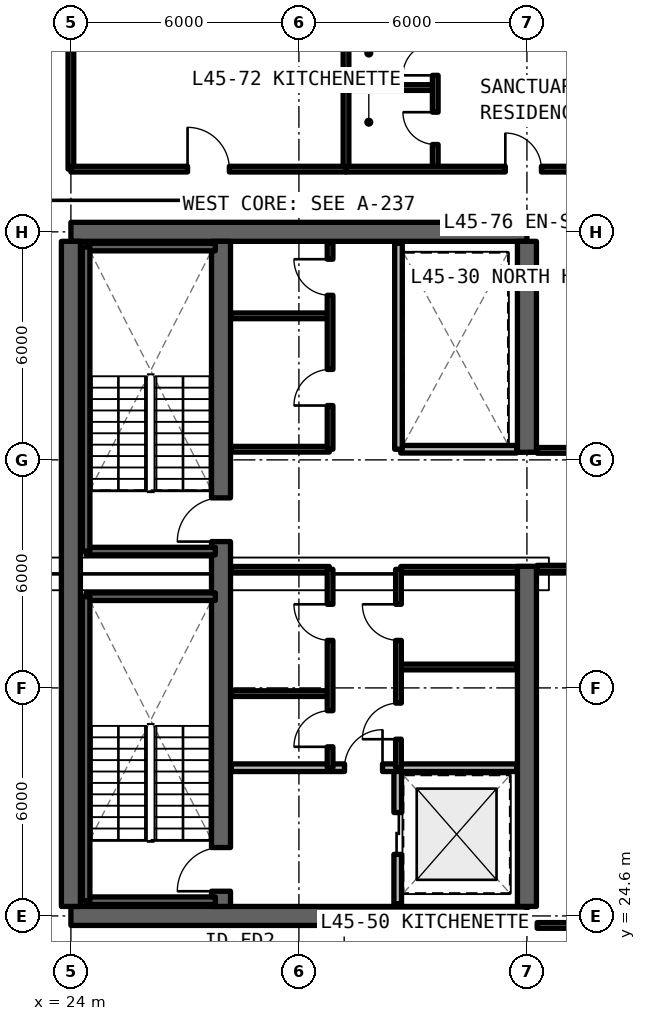
"""IFC4 building model, lengths in metres.
Left out: names, types, materials, properties, quantities, classifications, styles, units other than length and angle.
Written with IfcOpenShell. Run it as: python <this file> out.ifc"""

import sys

from ifc_helpers import new_model, si_unit, direction, frame, frame_2d, origin, place, context, subcontext, project, spatial, rectangle, extrude, element, fill, save


model = new_model("IFC4")
c1 = context("Model", 3, precision=1e-05, world=origin(), true_north=direction((0.0, 1.0)))
c2 = subcontext(c1, "Body", "Model", "MODEL_VIEW")
j1 = project(units=[si_unit("LENGTHUNIT", "METRE"), si_unit("PLANEANGLEUNIT", "RADIAN")], contexts=[c1])
p1 = place(None, origin())
s1 = spatial("IfcSite", under=j1, at=p1, CompositionType="ELEMENT")
p2 = place(p1, origin())
s2 = spatial("IfcBuilding", under=s1, at=p2, CompositionType="ELEMENT")
p3 = place(p2, frame((0.0, 0.0, 162.03)))
s3 = spatial("IfcBuildingStorey", under=s2, at=p3, CompositionType="ELEMENT", Elevation=162.03)
for number, where, z_axis, x_axis in (
    (1, (24.0, 24.6, 0.0), (0.0, 0.0, 1.0), (1.0, 0.0, 0.0)),
    (2, (36.0, 42.6, 0.0), (0.0, 0.0, 1.0), (-1.0, 0.0, 0.0)),
):
    element("IfcWall", number, at=place(p3, frame(where, z_axis=z_axis, x_axis=x_axis)), inside=s3, PredefinedType="SHEAR", context=c2, shape_type="SweptSolid", body=[
        extrude(rectangle(XDim=12.0, YDim=0.5, at=frame_2d((6.0, 0.0))), origin(), (0.0, 0.0, 1.0), 3.63),
    ])
p4 = place(p3, frame((24.0, 24.85, 0.0), z_axis=(0.0, 0.0, 1.0), x_axis=(0.0, 1.0, 0.0)))
e3 = element("IfcWall", 3, at=p4, inside=s3, PredefinedType="SHEAR", context=c2, shape_type="SweptSolid", body=[
    extrude(rectangle(XDim=17.5, YDim=0.5, at=frame_2d((8.75, 0.0))), origin(), (0.0, 0.0, 1.0), 3.63),
])
p5 = place(p3, frame((36.0, 24.85, 0.0), z_axis=(0.0, 0.0, 1.0), x_axis=(0.0, 1.0, 0.0)))
e4 = element("IfcWall", 4, at=p5, inside=s3, PredefinedType="SHEAR", context=c2, shape_type="SweptSolid", body=[
    extrude(rectangle(XDim=8.95, YDim=0.5, at=frame_2d((4.475, 0.0))), origin(), (0.0, 0.0, 1.0), 3.63),
])
p6 = place(p3, frame((36.0, 36.8, 0.0), z_axis=(0.0, 0.0, 1.0), x_axis=(0.0, 1.0, 0.0)))
e5 = element("IfcWall", 5, at=p6, inside=s3, PredefinedType="SHEAR", context=c2, shape_type="SweptSolid", body=[
    extrude(rectangle(XDim=5.55, YDim=0.5, at=frame_2d((2.775, 0.0))), origin(), (0.0, 0.0, 1.0), 3.63),
])
p7 = place(p3, frame((27.95, 24.85, 0.0), z_axis=(0.0, 0.0, 1.0), x_axis=(0.0, 1.0, 0.0)))
e6 = element("IfcWall", 6, at=p7, inside=s3, PredefinedType="SHEAR", context=c2, shape_type="SweptSolid", body=[
    extrude(rectangle(XDim=17.5, YDim=0.5, at=frame_2d((8.75, 0.0))), origin(), (0.0, 0.0, 1.0), 3.63),
])
p8 = place(p7, frame((0.4, 0.0, 0.0)))
e7 = element("IfcOpeningElement", 7, at=p8, cuts=e6, PredefinedType="OPENING", context=c2, shape_type="SweptSolid", body=[
    extrude(rectangle(XDim=1.15, YDim=2.15, at=frame_2d((0.575, 1.075))), frame((0.0, 0.26, 0.0), z_axis=(0.0, -1.0, 0.0), x_axis=(1.0, 0.0, 0.0)), (0.0, 0.0, 1.0), 0.52),
])
p9 = place(p7, frame((9.6, 0.0, 0.0)))
e8 = element("IfcOpeningElement", 8, at=p9, cuts=e6, PredefinedType="OPENING", context=c2, shape_type="SweptSolid", body=[
    extrude(rectangle(XDim=1.15, YDim=2.15, at=frame_2d((0.575, 1.075))), frame((0.0, 0.26, 0.0), z_axis=(0.0, -1.0, 0.0), x_axis=(1.0, 0.0, 0.0)), (0.0, 0.0, 1.0), 0.52),
])
p10 = place(p3, frame((32.6, 24.92, 0.0), z_axis=(0.0, 0.0, 1.0), x_axis=(0.0, 1.0, 0.0)))
e9 = element("IfcWall", 9, at=p10, inside=s3, PredefinedType="SOLIDWALL", context=c2, shape_type="SweptSolid", body=[
    extrude(rectangle(XDim=3.58, YDim=0.2, at=frame_2d((1.79, 0.0))), origin(), (0.0, 0.0, 1.0), 2.63),
])
p11 = place(p10, frame((1.3, 0.0, 0.0)))
e10 = element("IfcOpeningElement", 10, at=p11, cuts=e9, PredefinedType="OPENING", context=c2, shape_type="SweptSolid", body=[
    extrude(rectangle(XDim=1.1, YDim=2.2, at=frame_2d((0.55, 1.1))), frame((0.0, 0.11, 0.0), z_axis=(0.0, -1.0, 0.0), x_axis=(1.0, 0.0, 0.0)), (0.0, 0.0, 1.0), 0.22),
])
p12 = place(p3, frame((28.22, 28.5, 0.0), z_axis=(0.0, 0.0, 1.0), x_axis=(1.0, 0.0, 0.0)))
e11 = element("IfcWall", 11, at=p12, inside=s3, PredefinedType="SOLIDWALL", context=c2, shape_type="SweptSolid", body=[
    extrude(rectangle(XDim=7.51, YDim=0.2, at=frame_2d((3.755, 0.0))), origin(), (0.0, 0.0, 1.0), 2.63),
])
p13 = place(p12, frame((2.98, 0.0, 0.0)))
e12 = element("IfcOpeningElement", 12, at=p13, cuts=e11, PredefinedType="OPENING", context=c2, shape_type="SweptSolid", body=[
    extrude(rectangle(XDim=1.0, YDim=2.15, at=frame_2d((0.5, 1.075))), frame((0.0, 0.11, 0.0), z_axis=(0.0, -1.0, 0.0), x_axis=(1.0, 0.0, 0.0)), (0.0, 0.0, 1.0), 0.22),
])
for number, where, z_axis, x_axis in (
    (13, (28.22, 30.45, 0.0), (0.0, 0.0, 1.0), (1.0, 0.0, 0.0)),
    (14, (28.22, 33.72, 0.0), (0.0, 0.0, 1.0), (1.0, 0.0, 0.0)),
):
    element("IfcWall", number, at=place(p3, frame(where, z_axis=z_axis, x_axis=x_axis)), inside=s3, PredefinedType="SOLIDWALL", context=c2, shape_type="SweptSolid", body=[
        extrude(rectangle(XDim=2.58, YDim=0.15, at=frame_2d((1.29, 0.0))), origin(), (0.0, 0.0, 1.0), 2.63),
    ])
p14 = place(p3, frame((30.82, 28.5, 0.0), z_axis=(0.0, 0.0, 1.0), x_axis=(0.0, 1.0, 0.0)))
e15 = element("IfcWall", 15, at=p14, inside=s3, PredefinedType="SOLIDWALL", context=c2, shape_type="SweptSolid", body=[
    extrude(rectangle(XDim=5.22, YDim=0.15, at=frame_2d((2.61, 0.0))), origin(), (0.0, 0.0, 1.0), 2.63),
])
p15 = place(p14, frame((0.55, 0.0, 0.0)))
e16 = element("IfcOpeningElement", 16, at=p15, cuts=e15, PredefinedType="OPENING", context=c2, shape_type="SweptSolid", body=[
    extrude(rectangle(XDim=0.95, YDim=2.15, at=frame_2d((0.475, 1.075))), frame((0.0, 0.085, 0.0), z_axis=(0.0, -1.0, 0.0), x_axis=(1.0, 0.0, 0.0)), (0.0, 0.0, 1.0), 0.17),
])
p16 = place(p14, frame((3.35, 0.0, 0.0)))
e17 = element("IfcOpeningElement", 17, at=p16, cuts=e15, PredefinedType="OPENING", context=c2, shape_type="SweptSolid", body=[
    extrude(rectangle(XDim=0.95, YDim=2.15, at=frame_2d((0.475, 1.075))), frame((0.0, 0.085, 0.0), z_axis=(0.0, -1.0, 0.0), x_axis=(1.0, 0.0, 0.0)), (0.0, 0.0, 1.0), 0.17),
])
for number, where, z_axis, x_axis in (
    (18, (32.68, 31.15, 0.0), (0.0, 0.0, 1.0), (1.0, 0.0, 0.0)),
    (19, (32.68, 33.72, 0.0), (0.0, 0.0, 1.0), (1.0, 0.0, 0.0)),
):
    element("IfcWall", number, at=place(p3, frame(where, z_axis=z_axis, x_axis=x_axis)), inside=s3, PredefinedType="SOLIDWALL", context=c2, shape_type="SweptSolid", body=[
        extrude(rectangle(XDim=3.05, YDim=0.15, at=frame_2d((1.525, 0.0))), origin(), (0.0, 0.0, 1.0), 2.63),
    ])
p17 = place(p3, frame((32.62, 28.5, 0.0), z_axis=(0.0, 0.0, 1.0), x_axis=(0.0, 1.0, 0.0)))
e20 = element("IfcWall", 20, at=p17, inside=s3, PredefinedType="SOLIDWALL", context=c2, shape_type="SweptSolid", body=[
    extrude(rectangle(XDim=5.22, YDim=0.15, at=frame_2d((2.61, 0.0))), origin(), (0.0, 0.0, 1.0), 2.63),
])
p18 = place(p17, frame((0.75, 0.0, 0.0)))
e21 = element("IfcOpeningElement", 21, at=p18, cuts=e20, PredefinedType="OPENING", context=c2, shape_type="SweptSolid", body=[
    extrude(rectangle(XDim=0.95, YDim=2.15, at=frame_2d((0.475, 1.075))), frame((0.0, 0.085, 0.0), z_axis=(0.0, -1.0, 0.0), x_axis=(1.0, 0.0, 0.0)), (0.0, 0.0, 1.0), 0.17),
])
p19 = place(p17, frame((3.35, 0.0, 0.0)))
e22 = element("IfcOpeningElement", 22, at=p19, cuts=e20, PredefinedType="OPENING", context=c2, shape_type="SweptSolid", body=[
    extrude(rectangle(XDim=0.95, YDim=2.15, at=frame_2d((0.475, 1.075))), frame((0.0, 0.085, 0.0), z_axis=(0.0, -1.0, 0.0), x_axis=(1.0, 0.0, 0.0)), (0.0, 0.0, 1.0), 0.17),
])
for number, where, z_axis, x_axis in (
    (23, (28.22, 36.88, 0.0), (0.0, 0.0, 1.0), (1.0, 0.0, 0.0)),
    (24, (28.22, 40.39, 0.0), (0.0, 0.0, 1.0), (1.0, 0.0, 0.0)),
):
    element("IfcWall", number, at=place(p3, frame(where, z_axis=z_axis, x_axis=x_axis)), inside=s3, PredefinedType="SOLIDWALL", context=c2, shape_type="SweptSolid", body=[
        extrude(rectangle(XDim=2.58, YDim=0.15, at=frame_2d((1.29, 0.0))), origin(), (0.0, 0.0, 1.0), 2.63),
    ])
p20 = place(p3, frame((30.82, 36.88, 0.0), z_axis=(0.0, 0.0, 1.0), x_axis=(0.0, 1.0, 0.0)))
e25 = element("IfcWall", 25, at=p20, inside=s3, PredefinedType="SOLIDWALL", context=c2, shape_type="SweptSolid", body=[
    extrude(rectangle(XDim=5.42, YDim=0.15, at=frame_2d((2.71, 0.0))), origin(), (0.0, 0.0, 1.0), 2.63),
])
p21 = place(p20, frame((1.15, 0.0, 0.0)))
e26 = element("IfcOpeningElement", 26, at=p21, cuts=e25, PredefinedType="OPENING", context=c2, shape_type="SweptSolid", body=[
    extrude(rectangle(XDim=0.95, YDim=2.15, at=frame_2d((0.475, 1.075))), frame((0.0, 0.085, 0.0), z_axis=(0.0, -1.0, 0.0), x_axis=(1.0, 0.0, 0.0)), (0.0, 0.0, 1.0), 0.17),
])
p22 = place(p20, frame((4.05, 0.0, 0.0)))
e27 = element("IfcOpeningElement", 27, at=p22, cuts=e25, PredefinedType="OPENING", context=c2, shape_type="SweptSolid", body=[
    extrude(rectangle(XDim=0.95, YDim=2.15, at=frame_2d((0.475, 1.075))), frame((0.0, 0.085, 0.0), z_axis=(0.0, -1.0, 0.0), x_axis=(1.0, 0.0, 0.0)), (0.0, 0.0, 1.0), 0.17),
])
p23 = place(p3, frame((32.68, 36.88, 0.0), z_axis=(0.0, 0.0, 1.0), x_axis=(1.0, 0.0, 0.0)))
e28 = element("IfcWall", 28, at=p23, inside=s3, PredefinedType="SOLIDWALL", context=c2, shape_type="SweptSolid", body=[
    extrude(rectangle(XDim=3.05, YDim=0.2, at=frame_2d((1.525, 0.0))), origin(), (0.0, 0.0, 1.0), 2.63),
])
p24 = place(p3, frame((32.62, 36.88, 0.0), z_axis=(0.0, 0.0, 1.0), x_axis=(0.0, 1.0, 0.0)))
e29 = element("IfcWall", 29, at=p24, inside=s3, PredefinedType="SOLIDWALL", context=c2, shape_type="SweptSolid", body=[
    extrude(rectangle(XDim=5.42, YDim=0.2, at=frame_2d((2.71, 0.0))), origin(), (0.0, 0.0, 1.0), 2.63),
])
p25 = place(p3, frame((36.27, 24.35, 0.0), z_axis=(0.0, 0.0, 1.0), x_axis=(1.0, 0.0, 0.0)))
e30 = element("IfcWall", 30, at=p25, inside=s3, PredefinedType="SOLIDWALL", context=c2, shape_type="SweptSolid", body=[
    extrude(rectangle(XDim=7.88, YDim=0.15, at=frame_2d((3.94, 0.0))), origin(), (0.0, 0.0, 1.0), 2.63),
])
p26 = place(p3, frame((36.27, 33.75, 0.0), z_axis=(0.0, 0.0, 1.0), x_axis=(1.0, 0.0, 0.0)))
e31 = element("IfcWall", 31, at=p26, inside=s3, PredefinedType="SOLIDWALL", context=c2, shape_type="SweptSolid", body=[
    extrude(rectangle(XDim=7.88, YDim=0.15, at=frame_2d((3.94, 0.0))), origin(), (0.0, 0.0, 1.0), 2.63),
])
p27 = place(p26, frame((3.465, 0.0, 0.0)))
e32 = element("IfcOpeningElement", 32, at=p27, cuts=e31, PredefinedType="OPENING", context=c2, shape_type="SweptSolid", body=[
    extrude(rectangle(XDim=0.95, YDim=2.15, at=frame_2d((0.475, 1.075))), frame((0.0, 0.085, 0.0), z_axis=(0.0, -1.0, 0.0), x_axis=(1.0, 0.0, 0.0)), (0.0, 0.0, 1.0), 0.17),
])
p28 = place(p3, frame((36.27, 36.85, 0.0), z_axis=(0.0, 0.0, 1.0), x_axis=(1.0, 0.0, 0.0)))
e33 = element("IfcWall", 33, at=p28, inside=s3, PredefinedType="SOLIDWALL", context=c2, shape_type="SweptSolid", body=[
    extrude(rectangle(XDim=7.88, YDim=0.15, at=frame_2d((3.94, 0.0))), origin(), (0.0, 0.0, 1.0), 2.63),
])
p29 = place(p28, frame((3.465, 0.0, 0.0)))
e34 = element("IfcOpeningElement", 34, at=p29, cuts=e33, PredefinedType="OPENING", context=c2, shape_type="SweptSolid", body=[
    extrude(rectangle(XDim=0.95, YDim=2.15, at=frame_2d((0.475, 1.075))), frame((0.0, 0.085, 0.0), z_axis=(0.0, -1.0, 0.0), x_axis=(1.0, 0.0, 0.0)), (0.0, 0.0, 1.0), 0.17),
])
p30 = place(p3, frame((36.27, 42.85, 0.0), z_axis=(0.0, 0.0, 1.0), x_axis=(1.0, 0.0, 0.0)))
e35 = element("IfcWall", 35, at=p30, inside=s3, PredefinedType="SOLIDWALL", context=c2, shape_type="SweptSolid", body=[
    extrude(rectangle(XDim=7.88, YDim=0.15, at=frame_2d((3.94, 0.0))), origin(), (0.0, 0.0, 1.0), 2.63),
])
p31 = place(p3, frame((24.0, 44.25, 0.0), z_axis=(0.0, 0.0, 1.0), x_axis=(0.0, 1.0, 0.0)))
e36 = element("IfcWall", 36, at=p31, inside=s3, PredefinedType="SOLIDWALL", context=c2, shape_type="SweptSolid", body=[
    extrude(rectangle(XDim=10.925, YDim=0.15, at=frame_2d((5.462, 0.0))), origin(), (0.0, 0.0, 1.0), 2.63),
])
p32 = place(p3, frame((31.24, 44.25, 0.0), z_axis=(0.0, 0.0, 1.0), x_axis=(0.0, 1.0, 0.0)))
e37 = element("IfcWall", 37, at=p32, inside=s3, PredefinedType="SOLIDWALL", context=c2, shape_type="SweptSolid", body=[
    extrude(rectangle(XDim=8.403, YDim=0.15, at=frame_2d((4.201, 0.0))), origin(), (0.0, 0.0, 1.0), 2.63),
])
p33 = place(p3, frame((24.0, 44.25, 0.0), z_axis=(0.0, 0.0, 1.0), x_axis=(1.0, 0.0, 0.0)))
e38 = element("IfcWall", 38, at=p33, inside=s3, PredefinedType="SOLIDWALL", context=c2, shape_type="SweptSolid", body=[
    extrude(rectangle(XDim=7.24, YDim=0.15, at=frame_2d((3.62, 0.0))), origin(), (0.0, 0.0, 1.0), 2.63),
])
p34 = place(p33, frame((3.07, 0.0, 0.0)))
e39 = element("IfcOpeningElement", 39, at=p34, cuts=e38, PredefinedType="OPENING", context=c2, shape_type="SweptSolid", body=[
    extrude(rectangle(XDim=1.1, YDim=2.15, at=frame_2d((0.55, 1.075))), frame((0.0, 0.085, 0.0), z_axis=(0.0, -1.0, 0.0), x_axis=(1.0, 0.0, 0.0)), (0.0, 0.0, 1.0), 0.17),
])
p35 = place(p3, frame((31.24, 46.397, 0.0), z_axis=(0.0, 0.0, 1.0), x_axis=(1.0, 0.0, 0.0)))
e40 = element("IfcWall", 40, at=p35, inside=s3, PredefinedType="PARTITIONING", context=c2, shape_type="SweptSolid", body=[
    extrude(rectangle(XDim=2.348, YDim=0.15, at=frame_2d((1.174, 0.0))), origin(), (0.0, 0.0, 1.0), 2.63),
])
p36 = place(p3, frame((33.588, 44.25, 0.0), z_axis=(0.0, 0.0, 1.0), x_axis=(0.0, 1.0, 0.0)))
e41 = element("IfcWall", 41, at=p36, inside=s3, PredefinedType="PARTITIONING", context=c2, shape_type="SweptSolid", body=[
    extrude(rectangle(XDim=3.639, YDim=0.15, at=frame_2d((1.819, 0.0))), origin(), (0.0, 0.0, 1.0), 2.63),
])
p37 = place(p36, frame((0.648, 0.0, 0.0)))
e42 = element("IfcOpeningElement", 42, at=p37, cuts=e41, PredefinedType="OPENING", context=c2, shape_type="SweptSolid", body=[
    extrude(rectangle(XDim=0.85, YDim=2.1, at=frame_2d((0.425, 1.05))), frame((0.0, 0.085, 0.0), z_axis=(0.0, -1.0, 0.0), x_axis=(1.0, 0.0, 0.0)), (0.0, 0.0, 1.0), 0.17),
])
p38 = place(p36, frame((2.468, 0.0, 0.0)))
e43 = element("IfcOpeningElement", 43, at=p38, cuts=e41, PredefinedType="OPENING", context=c2, shape_type="SweptSolid", body=[
    extrude(rectangle(XDim=0.85, YDim=2.1, at=frame_2d((0.425, 1.05))), frame((0.0, 0.085, 0.0), z_axis=(0.0, -1.0, 0.0), x_axis=(1.0, 0.0, 0.0)), (0.0, 0.0, 1.0), 0.17),
])
p39 = place(p3, frame((31.24, 44.25, 0.0), z_axis=(0.0, 0.0, 1.0), x_axis=(1.0, 0.0, 0.0)))
e44 = element("IfcWall", 44, at=p39, inside=s3, PredefinedType="SOLIDWALL", context=c2, shape_type="SweptSolid", body=[
    extrude(rectangle(XDim=6.906, YDim=0.15, at=frame_2d((3.453, 0.0))), origin(), (0.0, 0.0, 1.0), 2.63),
])
p40 = place(p39, frame((4.192, 0.0, 0.0)))
e45 = element("IfcOpeningElement", 45, at=p40, cuts=e44, PredefinedType="OPENING", context=c2, shape_type="SweptSolid", body=[
    extrude(rectangle(XDim=0.95, YDim=2.15, at=frame_2d((0.475, 1.075))), frame((0.0, 0.085, 0.0), z_axis=(0.0, -1.0, 0.0), x_axis=(1.0, 0.0, 0.0)), (0.0, 0.0, 1.0), 0.17),
])
for number, where, z_axis, x_axis in (
    (46, (24.4, 25.0, 0.0), (0.0, 0.0, 1.0), (1.0, 0.0, 0.0)),
    (47, (27.8, 33.0, 0.0), (0.0, 0.0, 1.0), (-1.0, 0.0, 0.0)),
):
    element("IfcWall", number, at=place(p3, frame(where, z_axis=z_axis, x_axis=x_axis)), inside=s3, PredefinedType="SOLIDWALL", context=c2, shape_type="SweptSolid", body=[
        extrude(rectangle(XDim=3.4, YDim=0.2, at=frame_2d((1.7, 0.0))), origin(), (0.0, 0.0, 1.0), 3.63),
    ])
p41 = place(p3, frame((24.4, 33.0, 0.0), z_axis=(0.0, 0.0, 1.0), x_axis=(0.0, -1.0, 0.0)))
e48 = element("IfcWall", 48, at=p41, inside=s3, PredefinedType="SOLIDWALL", context=c2, shape_type="SweptSolid", body=[
    extrude(rectangle(XDim=8.0, YDim=0.2, at=frame_2d((4.0, 0.0))), origin(), (0.0, 0.0, 1.0), 3.63),
])
for number, where, z_axis, x_axis in (
    (49, (24.4, 34.2, 0.0), (0.0, 0.0, 1.0), (1.0, 0.0, 0.0)),
    (50, (27.8, 42.2, 0.0), (0.0, 0.0, 1.0), (-1.0, 0.0, 0.0)),
):
    element("IfcWall", number, at=place(p3, frame(where, z_axis=z_axis, x_axis=x_axis)), inside=s3, PredefinedType="SOLIDWALL", context=c2, shape_type="SweptSolid", body=[
        extrude(rectangle(XDim=3.4, YDim=0.2, at=frame_2d((1.7, 0.0))), origin(), (0.0, 0.0, 1.0), 3.63),
    ])
p42 = place(p3, frame((24.4, 42.2, 0.0), z_axis=(0.0, 0.0, 1.0), x_axis=(0.0, -1.0, 0.0)))
e51 = element("IfcWall", 51, at=p42, inside=s3, PredefinedType="SOLIDWALL", context=c2, shape_type="SweptSolid", body=[
    extrude(rectangle(XDim=8.0, YDim=0.2, at=frame_2d((4.0, 0.0))), origin(), (0.0, 0.0, 1.0), 3.63),
])
p43 = place(p11, origin())
e52 = element("IfcDoor", 52, at=p43, inside=s3, OperationType="SLIDING_TO_LEFT", PredefinedType="DOOR", context=c2, shape_type="SweptSolid", body=[
    extrude(rectangle(XDim=1.1, YDim=2.2, at=frame_2d((0.55, 1.1))), frame((0.0, 0.025, 0.0), z_axis=(0.0, -1.0, 0.0), x_axis=(1.0, 0.0, 0.0)), (0.0, 0.0, 1.0), 0.05),
])
fill(e10, e52)
p44 = place(p13, origin())
e53 = element("IfcDoor", 53, at=p44, inside=s3, OperationType="SINGLE_SWING_RIGHT", PredefinedType="DOOR", context=c2, shape_type="SweptSolid", body=[
    extrude(rectangle(XDim=1.0, YDim=2.15, at=frame_2d((0.5, 1.075))), frame((0.0, 0.025, 0.0), z_axis=(0.0, -1.0, 0.0), x_axis=(1.0, 0.0, 0.0)), (0.0, 0.0, 1.0), 0.05),
])
fill(e12, e53)
p45 = place(p15, origin())
e54 = element("IfcDoor", 54, at=p45, inside=s3, OperationType="SINGLE_SWING_LEFT", PredefinedType="DOOR", context=c2, shape_type="SweptSolid", body=[
    extrude(rectangle(XDim=0.95, YDim=2.15, at=frame_2d((0.475, 1.075))), frame((0.0, 0.025, 0.0), z_axis=(0.0, -1.0, 0.0), x_axis=(1.0, 0.0, 0.0)), (0.0, 0.0, 1.0), 0.05),
])
fill(e16, e54)
p46 = place(p16, origin())
e55 = element("IfcDoor", 55, at=p46, inside=s3, OperationType="SINGLE_SWING_RIGHT", PredefinedType="DOOR", context=c2, shape_type="SweptSolid", body=[
    extrude(rectangle(XDim=0.95, YDim=2.15, at=frame_2d((0.475, 1.075))), frame((0.0, 0.025, 0.0), z_axis=(0.0, -1.0, 0.0), x_axis=(1.0, 0.0, 0.0)), (0.0, 0.0, 1.0), 0.05),
])
fill(e17, e55)
p47 = place(p18, origin())
e56 = element("IfcDoor", 56, at=p47, inside=s3, OperationType="SINGLE_SWING_LEFT", PredefinedType="DOOR", context=c2, shape_type="SweptSolid", body=[
    extrude(rectangle(XDim=0.95, YDim=2.15, at=frame_2d((0.475, 1.075))), frame((0.0, 0.025, 0.0), z_axis=(0.0, -1.0, 0.0), x_axis=(1.0, 0.0, 0.0)), (0.0, 0.0, 1.0), 0.05),
])
fill(e21, e56)
p48 = place(p19, origin())
e57 = element("IfcDoor", 57, at=p48, inside=s3, OperationType="SINGLE_SWING_RIGHT", PredefinedType="DOOR", context=c2, shape_type="SweptSolid", body=[
    extrude(rectangle(XDim=0.95, YDim=2.15, at=frame_2d((0.475, 1.075))), frame((0.0, 0.025, 0.0), z_axis=(0.0, -1.0, 0.0), x_axis=(1.0, 0.0, 0.0)), (0.0, 0.0, 1.0), 0.05),
])
fill(e22, e57)
p49 = place(p21, origin())
e58 = element("IfcDoor", 58, at=p49, inside=s3, OperationType="SINGLE_SWING_LEFT", PredefinedType="DOOR", context=c2, shape_type="SweptSolid", body=[
    extrude(rectangle(XDim=0.95, YDim=2.15, at=frame_2d((0.475, 1.075))), frame((0.0, 0.025, 0.0), z_axis=(0.0, -1.0, 0.0), x_axis=(1.0, 0.0, 0.0)), (0.0, 0.0, 1.0), 0.05),
])
fill(e26, e58)
p50 = place(p22, origin())
e59 = element("IfcDoor", 59, at=p50, inside=s3, OperationType="SINGLE_SWING_RIGHT", PredefinedType="DOOR", context=c2, shape_type="SweptSolid", body=[
    extrude(rectangle(XDim=0.95, YDim=2.15, at=frame_2d((0.475, 1.075))), frame((0.0, 0.025, 0.0), z_axis=(0.0, -1.0, 0.0), x_axis=(1.0, 0.0, 0.0)), (0.0, 0.0, 1.0), 0.05),
])
fill(e27, e59)
p51 = place(p34, origin())
e60 = element("IfcDoor", 60, at=p51, inside=s3, OperationType="SINGLE_SWING_LEFT", PredefinedType="DOOR", context=c2, shape_type="SweptSolid", body=[
    extrude(rectangle(XDim=1.1, YDim=2.15, at=frame_2d((0.55, 1.075))), frame((0.0, 0.025, 0.0), z_axis=(0.0, -1.0, 0.0), x_axis=(1.0, 0.0, 0.0)), (0.0, 0.0, 1.0), 0.05),
])
fill(e39, e60)
p52 = place(p37, origin())
e61 = element("IfcDoor", 61, at=p52, inside=s3, OperationType="SINGLE_SWING_RIGHT", PredefinedType="DOOR", context=c2, shape_type="SweptSolid", body=[
    extrude(rectangle(XDim=0.85, YDim=2.1, at=frame_2d((0.425, 1.05))), frame((0.0, 0.025, 0.0), z_axis=(0.0, -1.0, 0.0), x_axis=(1.0, 0.0, 0.0)), (0.0, 0.0, 1.0), 0.05),
])
fill(e42, e61)
p53 = place(p38, origin())
e62 = element("IfcDoor", 62, at=p53, inside=s3, OperationType="SINGLE_SWING_LEFT", PredefinedType="DOOR", context=c2, shape_type="SweptSolid", body=[
    extrude(rectangle(XDim=0.85, YDim=2.1, at=frame_2d((0.425, 1.05))), frame((0.0, 0.025, 0.0), z_axis=(0.0, -1.0, 0.0), x_axis=(1.0, 0.0, 0.0)), (0.0, 0.0, 1.0), 0.05),
])
fill(e43, e62)
p54 = place(p40, origin())
e63 = element("IfcDoor", 63, at=p54, inside=s3, OperationType="SINGLE_SWING_LEFT", PredefinedType="DOOR", context=c2, shape_type="SweptSolid", body=[
    extrude(rectangle(XDim=0.95, YDim=2.15, at=frame_2d((0.475, 1.075))), frame((0.0, 0.025, 0.0), z_axis=(0.0, -1.0, 0.0), x_axis=(1.0, 0.0, 0.0)), (0.0, 0.0, 1.0), 0.05),
])
fill(e45, e63)
p55 = place(p8, origin())
e64 = element("IfcDoor", 64, at=p55, inside=s3, OperationType="SINGLE_SWING_RIGHT", PredefinedType="DOOR", context=c2, shape_type="SweptSolid", body=[
    extrude(rectangle(XDim=1.15, YDim=2.15, at=frame_2d((0.575, 1.075))), frame((0.0, 0.025, 0.0), z_axis=(0.0, -1.0, 0.0), x_axis=(1.0, 0.0, 0.0)), (0.0, 0.0, 1.0), 0.05),
])
fill(e7, e64)
p56 = place(p9, origin())
e65 = element("IfcDoor", 65, at=p56, inside=s3, OperationType="SINGLE_SWING_LEFT", PredefinedType="DOOR", context=c2, shape_type="SweptSolid", body=[
    extrude(rectangle(XDim=1.15, YDim=2.15, at=frame_2d((0.575, 1.075))), frame((0.0, 0.025, 0.0), z_axis=(0.0, -1.0, 0.0), x_axis=(1.0, 0.0, 0.0)), (0.0, 0.0, 1.0), 0.05),
])
fill(e8, e65)
save(model, sys.argv[1])
